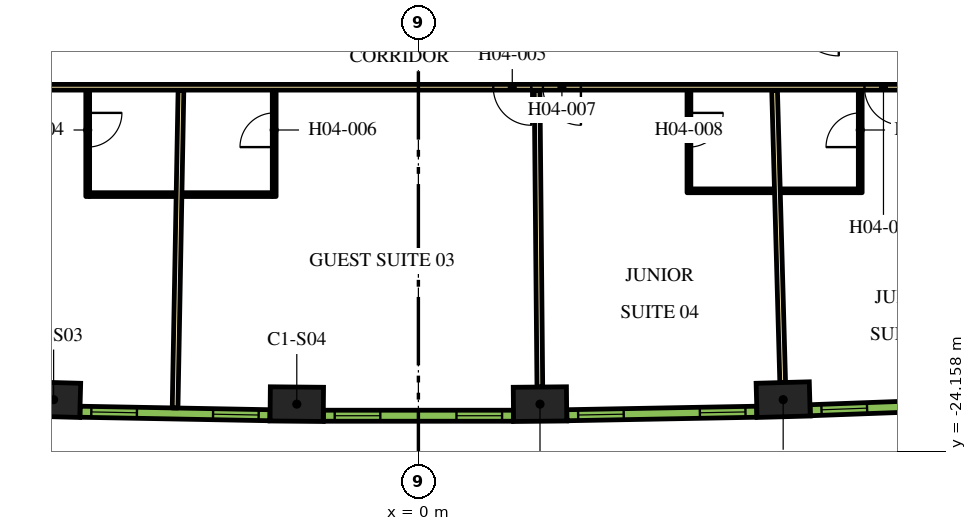
"""IFC4 building model, lengths in metres.
Left out: names, types, materials, properties, quantities, classifications, styles, units other than length and angle.
Written with IfcOpenShell. Run it as: python <this file> out.ifc"""

import sys

from ifc_helpers import new_model, si_unit, direction, frame, frame_2d, origin, origin_2d, place, context, subcontext, project, spatial, rectangle, extrude, element, fill, save


model = new_model("IFC4")
c1 = context("Model", 3, precision=1e-05, world=origin(), true_north=direction((0.0, 1.0)))
c2 = subcontext(c1, "Body", "Model", "MODEL_VIEW")
j1 = project(units=[si_unit("LENGTHUNIT", "METRE"), si_unit("PLANEANGLEUNIT", "RADIAN")], contexts=[c1])
p1 = place(None, origin())
s1 = spatial("IfcSite", under=j1, at=p1, CompositionType="ELEMENT")
p2 = place(p1, origin())
s2 = spatial("IfcBuilding", under=s1, at=p2, CompositionType="ELEMENT")
p3 = place(p2, frame((0.0, 0.0, 62.7)))
s3 = spatial("IfcBuildingStorey", under=s2, at=p3, CompositionType="ELEMENT", Elevation=62.7)
for number, where, z_axis, x_axis in (
    (1, (-9.599, -22.795, 0.0), (0.0, 0.0, 1.0), (1.0, -0.028, 0.0)),
    (2, (-3.2, -22.913, 0.0), (0.0, 0.0, 1.0), (1.0, -0.009, 0.0)),
    (3, (3.2, -22.913, 0.0), (0.0, 0.0, 1.0), (1.0, 0.009, 0.0)),
    (4, (9.599, -22.795, 0.0), (0.0, 0.0, 1.0), (1.0, 0.028, 0.0)),
):
    element("IfcColumn", number, at=place(p3, frame(where, z_axis=z_axis, x_axis=x_axis)), inside=s3, PredefinedType="COLUMN", context=c2, shape_type="SweptSolid", body=[
        extrude(rectangle(XDim=1.4, YDim=0.9, at=origin_2d()), origin(), (0.0, 0.0, 1.0), 3.9),
    ])
p4 = place(p3, frame((12.918, -14.575, 0.0), z_axis=(0.0, 0.0, 1.0), x_axis=(-1.0, 0.0, 0.0)))
e5 = element("IfcWall", 5, at=p4, inside=s3, PredefinedType="PARTITIONING", context=c2, shape_type="SweptSolid", body=[
    extrude(rectangle(XDim=25.766, YDim=0.15, at=frame_2d((12.883, 0.0))), origin(), (0.0, 0.0, 1.0), 2.75),
])
p5 = place(p4, frame((24.586, 0.0, 0.0)))
e6 = element("IfcOpeningElement", 6, at=p5, cuts=e5, PredefinedType="OPENING", context=c2, shape_type="SweptSolid", body=[
    extrude(rectangle(XDim=1.0, YDim=2.1, at=frame_2d((0.5, 1.05))), frame((0.0, 0.085, 0.0), z_axis=(0.0, -1.0, 0.0), x_axis=(1.0, 0.0, 0.0)), (0.0, 0.0, 1.0), 0.17),
])
p6 = place(p4, frame((9.948, 0.0, 0.0)))
e7 = element("IfcOpeningElement", 7, at=p6, cuts=e5, PredefinedType="OPENING", context=c2, shape_type="SweptSolid", body=[
    extrude(rectangle(XDim=1.0, YDim=2.1, at=frame_2d((0.5, 1.05))), frame((0.0, 0.085, 0.0), z_axis=(0.0, -1.0, 0.0), x_axis=(1.0, 0.0, 0.0)), (0.0, 0.0, 1.0), 0.17),
])
p7 = place(p4, frame((8.642, 0.0, 0.0)))
e8 = element("IfcOpeningElement", 8, at=p7, cuts=e5, PredefinedType="OPENING", context=c2, shape_type="SweptSolid", body=[
    extrude(rectangle(XDim=1.0, YDim=2.1, at=frame_2d((0.5, 1.05))), frame((0.0, 0.085, 0.0), z_axis=(0.0, -1.0, 0.0), x_axis=(1.0, 0.0, 0.0)), (0.0, 0.0, 1.0), 0.17),
])
p8 = place(p4, frame((0.18, 0.0, 0.0)))
e9 = element("IfcOpeningElement", 9, at=p8, cuts=e5, PredefinedType="OPENING", context=c2, shape_type="SweptSolid", body=[
    extrude(rectangle(XDim=1.0, YDim=2.1, at=frame_2d((0.5, 1.05))), frame((0.0, 0.085, 0.0), z_axis=(0.0, -1.0, 0.0), x_axis=(1.0, 0.0, 0.0)), (0.0, 0.0, 1.0), 0.17),
])
p9 = place(p3, frame((-6.402, -23.014, 0.0), z_axis=(0.0, 0.0, 1.0), x_axis=(0.01849587109, 0.999828936745, 0.0)))
e10 = element("IfcWall", 10, at=p9, inside=s3, PredefinedType="PARTITIONING", context=c2, shape_type="SweptSolid", body=[
    extrude(rectangle(XDim=8.355, YDim=0.15, at=frame_2d((4.178, 0.0))), origin(), (0.0, 0.0, 1.0), 2.75),
])
p10 = place(p3, frame((3.196, -22.463, 0.0), z_axis=(0.0, 0.0, 1.0), x_axis=(-0.00926060032, 0.999957119721, 0.0)))
e11 = element("IfcWall", 11, at=p10, inside=s3, PredefinedType="PARTITIONING", context=c2, shape_type="SweptSolid", body=[
    extrude(rectangle(XDim=7.803, YDim=0.15, at=frame_2d((3.902, 0.0))), origin(), (0.0, 0.0, 1.0), 2.75),
])
p11 = place(p3, frame((9.586, -22.345, 0.0), z_axis=(0.0, 0.0, 1.0), x_axis=(-0.027722115646, 0.999615668297, 0.0)))
e12 = element("IfcWall", 12, at=p11, inside=s3, PredefinedType="PARTITIONING", context=c2, shape_type="SweptSolid", body=[
    extrude(rectangle(XDim=7.688, YDim=0.15, at=frame_2d((3.844, 0.0))), origin(), (0.0, 0.0, 1.0), 2.75),
])
p12 = place(p3, frame((-8.702, -14.65, 0.0), z_axis=(0.0, 0.0, 1.0), x_axis=(0.0, -1.0, 0.0)))
e13 = element("IfcWall", 13, at=p12, inside=s3, PredefinedType="PARTITIONING", context=c2, shape_type="SweptSolid", body=[
    extrude(rectangle(XDim=2.8, YDim=0.1, at=frame_2d((1.4, 0.0))), origin(), (0.0, 0.0, 1.0), 2.75),
])
p13 = place(p12, frame((0.6, 0.0, 0.0)))
e14 = element("IfcOpeningElement", 14, at=p13, cuts=e13, PredefinedType="OPENING", context=c2, shape_type="SweptSolid", body=[
    extrude(rectangle(XDim=0.9, YDim=2.1, at=frame_2d((0.45, 1.05))), frame((0.0, 0.06, 0.0), z_axis=(0.0, -1.0, 0.0), x_axis=(1.0, 0.0, 0.0)), (0.0, 0.0, 1.0), 0.12),
])
p14 = place(p3, frame((-8.652, -17.4, 0.0), z_axis=(0.0, 0.0, 1.0), x_axis=(1.0, 0.0, 0.0)))
e15 = element("IfcWall", 15, at=p14, inside=s3, PredefinedType="PARTITIONING", context=c2, shape_type="SweptSolid", body=[
    extrude(rectangle(XDim=2.27, YDim=0.1, at=frame_2d((1.135, 0.0))), origin(), (0.0, 0.0, 1.0), 2.75),
])
p15 = place(p3, frame((-3.794, -17.45, 0.0), z_axis=(0.0, 0.0, 1.0), x_axis=(0.0, 1.0, 0.0)))
e16 = element("IfcWall", 16, at=p15, inside=s3, PredefinedType="PARTITIONING", context=c2, shape_type="SweptSolid", body=[
    extrude(rectangle(XDim=2.8, YDim=0.1, at=frame_2d((1.4, 0.0))), origin(), (0.0, 0.0, 1.0), 2.75),
])
p16 = place(p15, frame((1.3, 0.0, 0.0)))
e17 = element("IfcOpeningElement", 17, at=p16, cuts=e16, PredefinedType="OPENING", context=c2, shape_type="SweptSolid", body=[
    extrude(rectangle(XDim=0.9, YDim=2.1, at=frame_2d((0.45, 1.05))), frame((0.0, 0.06, 0.0), z_axis=(0.0, -1.0, 0.0), x_axis=(1.0, 0.0, 0.0)), (0.0, 0.0, 1.0), 0.12),
])
p17 = place(p3, frame((-3.844, -17.4, 0.0), z_axis=(0.0, 0.0, 1.0), x_axis=(-1.0, 0.0, 0.0)))
e18 = element("IfcWall", 18, at=p17, inside=s3, PredefinedType="PARTITIONING", context=c2, shape_type="SweptSolid", body=[
    extrude(rectangle(XDim=2.37, YDim=0.1, at=frame_2d((1.185, 0.0))), origin(), (0.0, 0.0, 1.0), 2.75),
])
p18 = place(p3, frame((7.119, -14.65, 0.0), z_axis=(0.0, 0.0, 1.0), x_axis=(0.0, -1.0, 0.0)))
e19 = element("IfcWall", 19, at=p18, inside=s3, PredefinedType="PARTITIONING", context=c2, shape_type="SweptSolid", body=[
    extrude(rectangle(XDim=2.7, YDim=0.1, at=frame_2d((1.35, 0.0))), origin(), (0.0, 0.0, 1.0), 2.75),
])
p19 = place(p18, frame((0.6, 0.0, 0.0)))
e20 = element("IfcOpeningElement", 20, at=p19, cuts=e19, PredefinedType="OPENING", context=c2, shape_type="SweptSolid", body=[
    extrude(rectangle(XDim=0.9, YDim=2.1, at=frame_2d((0.45, 1.05))), frame((0.0, 0.06, 0.0), z_axis=(0.0, -1.0, 0.0), x_axis=(1.0, 0.0, 0.0)), (0.0, 0.0, 1.0), 0.12),
])
p20 = place(p3, frame((7.169, -17.3, 0.0), z_axis=(0.0, 0.0, 1.0), x_axis=(1.0, 0.0, 0.0)))
e21 = element("IfcWall", 21, at=p20, inside=s3, PredefinedType="PARTITIONING", context=c2, shape_type="SweptSolid", body=[
    extrude(rectangle(XDim=2.2, YDim=0.1, at=frame_2d((1.1, 0.0))), origin(), (0.0, 0.0, 1.0), 2.75),
])
p21 = place(p3, frame((11.627, -17.35, 0.0), z_axis=(0.0, 0.0, 1.0), x_axis=(0.0, 1.0, 0.0)))
e22 = element("IfcWall", 22, at=p21, inside=s3, PredefinedType="PARTITIONING", context=c2, shape_type="SweptSolid", body=[
    extrude(rectangle(XDim=2.7, YDim=0.1, at=frame_2d((1.35, 0.0))), origin(), (0.0, 0.0, 1.0), 2.75),
])
p22 = place(p21, frame((1.2, 0.0, 0.0)))
e23 = element("IfcOpeningElement", 23, at=p22, cuts=e22, PredefinedType="OPENING", context=c2, shape_type="SweptSolid", body=[
    extrude(rectangle(XDim=0.9, YDim=2.1, at=frame_2d((0.45, 1.05))), frame((0.0, 0.06, 0.0), z_axis=(0.0, -1.0, 0.0), x_axis=(1.0, 0.0, 0.0)), (0.0, 0.0, 1.0), 0.12),
])
p23 = place(p3, frame((11.577, -17.3, 0.0), z_axis=(0.0, 0.0, 1.0), x_axis=(-1.0, 0.0, 0.0)))
e24 = element("IfcWall", 24, at=p23, inside=s3, PredefinedType="PARTITIONING", context=c2, shape_type="SweptSolid", body=[
    extrude(rectangle(XDim=2.05, YDim=0.1, at=frame_2d((1.025, 0.0))), origin(), (0.0, 0.0, 1.0), 2.75),
])
p24 = place(p3, frame((-8.904, -23.113, 0.0), z_axis=(0.0, 0.0, 1.0), x_axis=(0.999829529479, -0.018463801951, 0.0)))
e25 = element("IfcWall", 25, at=p24, inside=s3, PredefinedType="SOLIDWALL", context=c2, shape_type="SweptSolid", body=[
    extrude(rectangle(XDim=4.998, YDim=0.29, at=frame_2d((2.499, 0.0))), origin(), (0.0, 0.0, 1.0), 3.65),
])
p25 = place(p24, frame((0.297, 0.0, 0.9)))
e26 = element("IfcOpeningElement", 26, at=p25, cuts=e25, PredefinedType="OPENING", context=c2, shape_type="SweptSolid", body=[
    extrude(rectangle(XDim=1.2, YDim=2.15, at=frame_2d((0.6, 1.075))), frame((0.0, 0.155, 0.0), z_axis=(0.0, -1.0, 0.0), x_axis=(1.0, 0.0, 0.0)), (0.0, 0.0, 1.0), 0.31),
])
p26 = place(p24, frame((3.501, 0.0, 0.9)))
e27 = element("IfcOpeningElement", 27, at=p26, cuts=e25, PredefinedType="OPENING", context=c2, shape_type="SweptSolid", body=[
    extrude(rectangle(XDim=1.2, YDim=2.15, at=frame_2d((0.6, 1.075))), frame((0.0, 0.155, 0.0), z_axis=(0.0, -1.0, 0.0), x_axis=(1.0, 0.0, 0.0)), (0.0, 0.0, 1.0), 0.31),
])
p27 = place(p3, frame((-2.499, -23.218, 0.0), z_axis=(0.0, 0.0, 1.0), x_axis=(1.0, 0.0, 0.0)))
e28 = element("IfcWall", 28, at=p27, inside=s3, PredefinedType="SOLIDWALL", context=c2, shape_type="SweptSolid", body=[
    extrude(rectangle(XDim=4.998, YDim=0.29, at=frame_2d((2.499, 0.0))), origin(), (0.0, 0.0, 1.0), 3.65),
])
p28 = place(p27, frame((0.297, 0.0, 0.9)))
e29 = element("IfcOpeningElement", 29, at=p28, cuts=e28, PredefinedType="OPENING", context=c2, shape_type="SweptSolid", body=[
    extrude(rectangle(XDim=1.2, YDim=2.15, at=frame_2d((0.6, 1.075))), frame((0.0, 0.155, 0.0), z_axis=(0.0, -1.0, 0.0), x_axis=(1.0, 0.0, 0.0)), (0.0, 0.0, 1.0), 0.31),
])
p29 = place(p27, frame((3.501, 0.0, 0.9)))
e30 = element("IfcOpeningElement", 30, at=p29, cuts=e28, PredefinedType="OPENING", context=c2, shape_type="SweptSolid", body=[
    extrude(rectangle(XDim=1.2, YDim=2.15, at=frame_2d((0.6, 1.075))), frame((0.0, 0.155, 0.0), z_axis=(0.0, -1.0, 0.0), x_axis=(1.0, 0.0, 0.0)), (0.0, 0.0, 1.0), 0.31),
])
p30 = place(p3, frame((3.906, -23.205, 0.0), z_axis=(0.0, 0.0, 1.0), x_axis=(0.999829529479, 0.018463801951, 0.0)))
e31 = element("IfcWall", 31, at=p30, inside=s3, PredefinedType="SOLIDWALL", context=c2, shape_type="SweptSolid", body=[
    extrude(rectangle(XDim=4.998, YDim=0.29, at=frame_2d((2.499, 0.0))), origin(), (0.0, 0.0, 1.0), 3.65),
])
p31 = place(p30, frame((0.297, 0.0, 0.9)))
e32 = element("IfcOpeningElement", 32, at=p31, cuts=e31, PredefinedType="OPENING", context=c2, shape_type="SweptSolid", body=[
    extrude(rectangle(XDim=1.2, YDim=2.15, at=frame_2d((0.6, 1.075))), frame((0.0, 0.155, 0.0), z_axis=(0.0, -1.0, 0.0), x_axis=(1.0, 0.0, 0.0)), (0.0, 0.0, 1.0), 0.31),
])
p32 = place(p30, frame((3.501, 0.0, 0.9)))
e33 = element("IfcOpeningElement", 33, at=p32, cuts=e31, PredefinedType="OPENING", context=c2, shape_type="SweptSolid", body=[
    extrude(rectangle(XDim=1.2, YDim=2.15, at=frame_2d((0.6, 1.075))), frame((0.0, 0.155, 0.0), z_axis=(0.0, -1.0, 0.0), x_axis=(1.0, 0.0, 0.0)), (0.0, 0.0, 1.0), 0.31),
])
p33 = place(p3, frame((10.31, -23.074, 0.0), z_axis=(0.0, 0.0, 1.0), x_axis=(0.999317974969, 0.036926750529, 0.0)))
e34 = element("IfcWall", 34, at=p33, inside=s3, PredefinedType="SOLIDWALL", context=c2, shape_type="SweptSolid", body=[
    extrude(rectangle(XDim=4.998, YDim=0.29, at=frame_2d((2.499, 0.0))), origin(), (0.0, 0.0, 1.0), 3.65),
])
p34 = place(p33, frame((0.297, 0.0, 0.9)))
e35 = element("IfcOpeningElement", 35, at=p34, cuts=e34, PredefinedType="OPENING", context=c2, shape_type="SweptSolid", body=[
    extrude(rectangle(XDim=1.2, YDim=2.15, at=frame_2d((0.6, 1.075))), frame((0.0, 0.155, 0.0), z_axis=(0.0, -1.0, 0.0), x_axis=(1.0, 0.0, 0.0)), (0.0, 0.0, 1.0), 0.31),
])
p35 = place(p33, frame((3.501, 0.0, 0.9)))
e36 = element("IfcOpeningElement", 36, at=p35, cuts=e34, PredefinedType="OPENING", context=c2, shape_type="SweptSolid", body=[
    extrude(rectangle(XDim=1.2, YDim=2.15, at=frame_2d((0.6, 1.075))), frame((0.0, 0.155, 0.0), z_axis=(0.0, -1.0, 0.0), x_axis=(1.0, 0.0, 0.0)), (0.0, 0.0, 1.0), 0.31),
])
p36 = place(p13, origin())
e37 = element("IfcDoor", 37, at=p36, inside=s3, OperationType="SINGLE_SWING_LEFT", PredefinedType="DOOR", context=c2, shape_type="SweptSolid", body=[
    extrude(rectangle(XDim=0.9, YDim=2.1, at=frame_2d((0.45, 1.05))), frame((0.0, 0.025, 0.0), z_axis=(0.0, -1.0, 0.0), x_axis=(1.0, 0.0, 0.0)), (0.0, 0.0, 1.0), 0.05),
])
fill(e14, e37)
p37 = place(p6, origin())
e38 = element("IfcDoor", 38, at=p37, inside=s3, OperationType="SINGLE_SWING_LEFT", PredefinedType="DOOR", context=c2, shape_type="SweptSolid", body=[
    extrude(rectangle(XDim=1.0, YDim=2.1, at=frame_2d((0.5, 1.05))), frame((0.0, 0.025, 0.0), z_axis=(0.0, -1.0, 0.0), x_axis=(1.0, 0.0, 0.0)), (0.0, 0.0, 1.0), 0.05),
])
fill(e7, e38)
p38 = place(p16, origin())
e39 = element("IfcDoor", 39, at=p38, inside=s3, OperationType="SINGLE_SWING_RIGHT", PredefinedType="DOOR", context=c2, shape_type="SweptSolid", body=[
    extrude(rectangle(XDim=0.9, YDim=2.1, at=frame_2d((0.45, 1.05))), frame((0.0, 0.025, 0.0), z_axis=(0.0, -1.0, 0.0), x_axis=(1.0, 0.0, 0.0)), (0.0, 0.0, 1.0), 0.05),
])
fill(e17, e39)
p39 = place(p7, origin())
e40 = element("IfcDoor", 40, at=p39, inside=s3, OperationType="SINGLE_SWING_RIGHT", PredefinedType="DOOR", context=c2, shape_type="SweptSolid", body=[
    extrude(rectangle(XDim=1.0, YDim=2.1, at=frame_2d((0.5, 1.05))), frame((0.0, 0.025, 0.0), z_axis=(0.0, -1.0, 0.0), x_axis=(1.0, 0.0, 0.0)), (0.0, 0.0, 1.0), 0.05),
])
fill(e8, e40)
p40 = place(p19, origin())
e41 = element("IfcDoor", 41, at=p40, inside=s3, OperationType="SINGLE_SWING_LEFT", PredefinedType="DOOR", context=c2, shape_type="SweptSolid", body=[
    extrude(rectangle(XDim=0.9, YDim=2.1, at=frame_2d((0.45, 1.05))), frame((0.0, 0.025, 0.0), z_axis=(0.0, -1.0, 0.0), x_axis=(1.0, 0.0, 0.0)), (0.0, 0.0, 1.0), 0.05),
])
fill(e20, e41)
p41 = place(p8, origin())
e42 = element("IfcDoor", 42, at=p41, inside=s3, OperationType="SINGLE_SWING_LEFT", PredefinedType="DOOR", context=c2, shape_type="SweptSolid", body=[
    extrude(rectangle(XDim=1.0, YDim=2.1, at=frame_2d((0.5, 1.05))), frame((0.0, 0.025, 0.0), z_axis=(0.0, -1.0, 0.0), x_axis=(1.0, 0.0, 0.0)), (0.0, 0.0, 1.0), 0.05),
])
fill(e9, e42)
p42 = place(p22, origin())
e43 = element("IfcDoor", 43, at=p42, inside=s3, OperationType="SINGLE_SWING_LEFT", PredefinedType="DOOR", context=c2, shape_type="SweptSolid", body=[
    extrude(rectangle(XDim=0.9, YDim=2.1, at=frame_2d((0.45, 1.05))), frame((0.0, 0.025, 0.0), z_axis=(0.0, -1.0, 0.0), x_axis=(1.0, 0.0, 0.0)), (0.0, 0.0, 1.0), 0.05),
])
fill(e23, e43)
p43 = place(p25, origin())
e44 = element("IfcWindow", 44, at=p43, inside=s3, PartitioningType="DOUBLE_PANEL_VERTICAL", PredefinedType="WINDOW", context=c2, shape_type="SweptSolid", body=[
    extrude(rectangle(XDim=1.2, YDim=2.15, at=frame_2d((0.6, 1.075))), frame((0.0, 0.015, 0.0), z_axis=(0.0, -1.0, 0.0), x_axis=(1.0, 0.0, 0.0)), (0.0, 0.0, 1.0), 0.06),
])
fill(e26, e44)
p44 = place(p26, origin())
e45 = element("IfcWindow", 45, at=p44, inside=s3, PartitioningType="DOUBLE_PANEL_VERTICAL", PredefinedType="WINDOW", context=c2, shape_type="SweptSolid", body=[
    extrude(rectangle(XDim=1.2, YDim=2.15, at=frame_2d((0.6, 1.075))), frame((0.0, 0.015, 0.0), z_axis=(0.0, -1.0, 0.0), x_axis=(1.0, 0.0, 0.0)), (0.0, 0.0, 1.0), 0.06),
])
fill(e27, e45)
p45 = place(p28, origin())
e46 = element("IfcWindow", 46, at=p45, inside=s3, PartitioningType="DOUBLE_PANEL_VERTICAL", PredefinedType="WINDOW", context=c2, shape_type="SweptSolid", body=[
    extrude(rectangle(XDim=1.2, YDim=2.15, at=frame_2d((0.6, 1.075))), frame((0.0, 0.015, 0.0), z_axis=(0.0, -1.0, 0.0), x_axis=(1.0, 0.0, 0.0)), (0.0, 0.0, 1.0), 0.06),
])
fill(e29, e46)
p46 = place(p29, origin())
e47 = element("IfcWindow", 47, at=p46, inside=s3, PartitioningType="DOUBLE_PANEL_VERTICAL", PredefinedType="WINDOW", context=c2, shape_type="SweptSolid", body=[
    extrude(rectangle(XDim=1.2, YDim=2.15, at=frame_2d((0.6, 1.075))), frame((0.0, 0.015, 0.0), z_axis=(0.0, -1.0, 0.0), x_axis=(1.0, 0.0, 0.0)), (0.0, 0.0, 1.0), 0.06),
])
fill(e30, e47)
p47 = place(p31, origin())
e48 = element("IfcWindow", 48, at=p47, inside=s3, PartitioningType="DOUBLE_PANEL_VERTICAL", PredefinedType="WINDOW", context=c2, shape_type="SweptSolid", body=[
    extrude(rectangle(XDim=1.2, YDim=2.15, at=frame_2d((0.6, 1.075))), frame((0.0, 0.015, 0.0), z_axis=(0.0, -1.0, 0.0), x_axis=(1.0, 0.0, 0.0)), (0.0, 0.0, 1.0), 0.06),
])
fill(e32, e48)
p48 = place(p32, origin())
e49 = element("IfcWindow", 49, at=p48, inside=s3, PartitioningType="DOUBLE_PANEL_VERTICAL", PredefinedType="WINDOW", context=c2, shape_type="SweptSolid", body=[
    extrude(rectangle(XDim=1.2, YDim=2.15, at=frame_2d((0.6, 1.075))), frame((0.0, 0.015, 0.0), z_axis=(0.0, -1.0, 0.0), x_axis=(1.0, 0.0, 0.0)), (0.0, 0.0, 1.0), 0.06),
])
fill(e33, e49)
p49 = place(p34, origin())
e50 = element("IfcWindow", 50, at=p49, inside=s3, PartitioningType="DOUBLE_PANEL_VERTICAL", PredefinedType="WINDOW", context=c2, shape_type="SweptSolid", body=[
    extrude(rectangle(XDim=1.2, YDim=2.15, at=frame_2d((0.6, 1.075))), frame((0.0, 0.015, 0.0), z_axis=(0.0, -1.0, 0.0), x_axis=(1.0, 0.0, 0.0)), (0.0, 0.0, 1.0), 0.06),
])
fill(e35, e50)
save(model, sys.argv[1])
